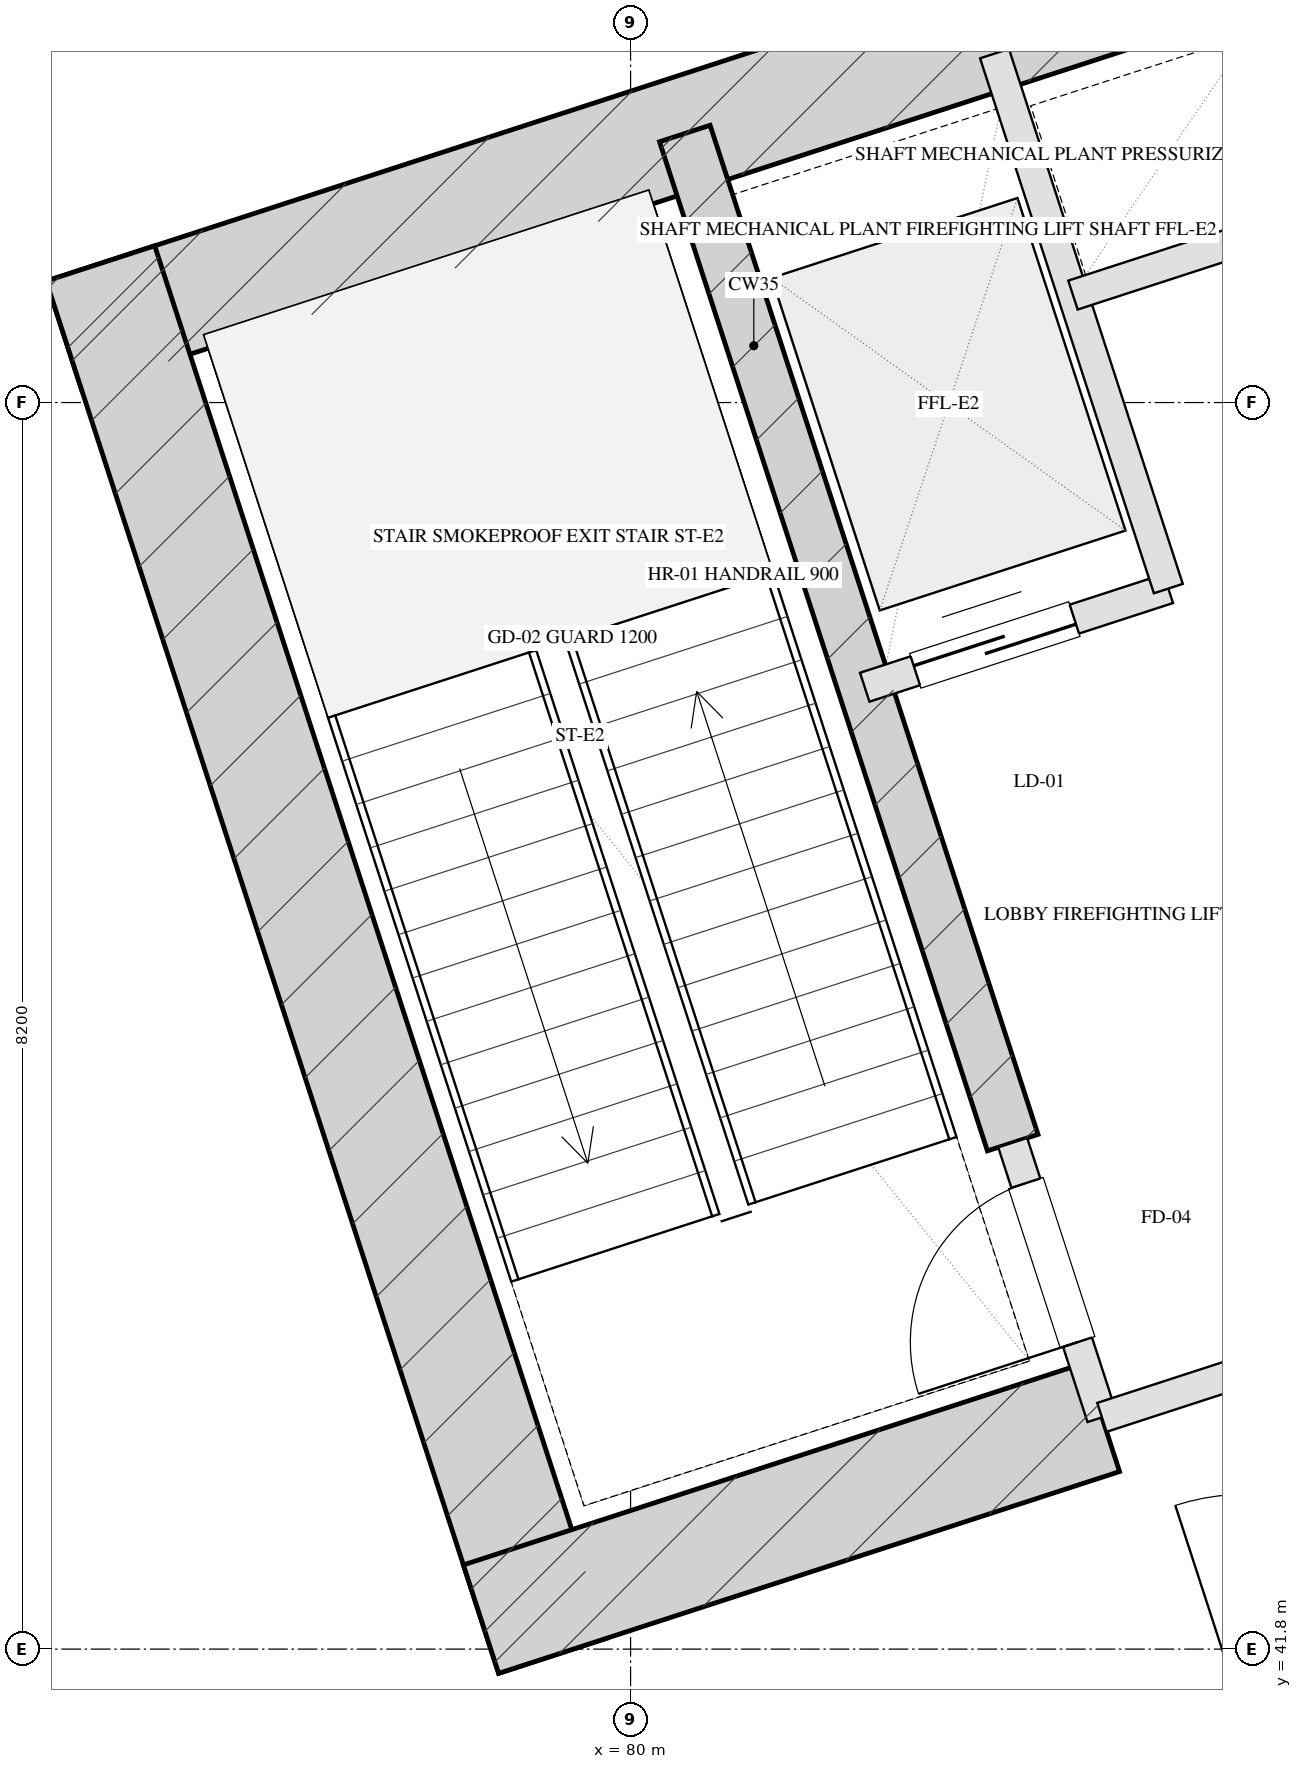
"""IFC4 building model, lengths in metres.
Left out: names, types, materials, properties, quantities, classifications, styles, units other than length and angle.
Written with IfcOpenShell. Run it as: python <this file> out.ifc"""

import sys

from ifc_helpers import new_model, si_unit, direction, frame, frame_2d, origin, place, context, subcontext, project, spatial, rectangle, extrude, element, fill, save


model = new_model("IFC4")
c1 = context("Model", 3, precision=1e-05, world=origin(), true_north=direction((0.0, 1.0)))
c2 = subcontext(c1, "Body", "Model", "MODEL_VIEW")
j1 = project(units=[si_unit("LENGTHUNIT", "METRE"), si_unit("PLANEANGLEUNIT", "RADIAN")], contexts=[c1])
p1 = place(None, origin())
s1 = spatial("IfcSite", under=j1, at=p1, CompositionType="ELEMENT")
p2 = place(p1, origin())
s2 = spatial("IfcBuilding", under=s1, at=p2, CompositionType="ELEMENT")
p3 = place(p2, frame((0.0, 0.0, 92.0)))
s3 = spatial("IfcBuildingStorey", under=s2, at=p3, CompositionType="ELEMENT", Elevation=92.0)
p4 = place(p3, frame((76.272, 50.443, 0.0), z_axis=(0.0, 0.0, 1.0), x_axis=(0.951056072937, 0.309018358888, 0.0)))
e1 = element("IfcWall", 1, at=p4, inside=s3, PredefinedType="SHEAR", context=c2, shape_type="SweptSolid", body=[
    extrude(rectangle(XDim=16.55, YDim=0.75, at=frame_2d((8.275, 0.0))), origin(), (0.0, 0.0, 1.0), 4.6),
])
p5 = place(p3, frame((79.489, 41.756, 0.0), z_axis=(0.0, 0.0, 1.0), x_axis=(-0.309016134813, 0.951056795583, 0.0)))
e2 = element("IfcWall", 2, at=p5, inside=s3, PredefinedType="SHEAR", context=c2, shape_type="SweptSolid", body=[
    extrude(rectangle(XDim=9.63, YDim=0.75, at=frame_2d((4.815, 0.0))), origin(), (0.0, 0.0, 1.0), 4.6),
])
p6 = place(p3, frame((82.514, 45.131, 0.0), z_axis=(0.0, 0.0, 1.0), x_axis=(-0.308988790936, 0.951065679686, 0.0)))
e3 = element("IfcWall", 3, at=p6, inside=s3, PredefinedType="SHEAR", context=c2, shape_type="SweptSolid", body=[
    extrude(rectangle(XDim=6.98, YDim=0.35, at=frame_2d((3.49, 0.0))), origin(), (0.0, 0.0, 1.0), 4.6),
])
p7 = place(p3, frame((79.016, 41.997, 0.0), z_axis=(0.0, 0.0, 1.0), x_axis=(0.95106038264, 0.309005094736, 0.0)))
e4 = element("IfcWall", 4, at=p7, inside=s3, PredefinedType="SHEAR", context=c2, shape_type="SweptSolid", body=[
    extrude(rectangle(XDim=4.295, YDim=0.75, at=frame_2d((2.147, 0.0))), origin(), (0.0, 0.0, 1.0), 4.6),
])
p8 = place(p3, frame((80.716, 6.59, 0.0), z_axis=(0.0, 0.0, 1.0), x_axis=(-0.309017542002, 0.95105633836, 0.0)))
e5 = element("IfcWall", 5, at=p8, inside=s3, PredefinedType="SOLIDWALL", context=c2, shape_type="SweptSolid", body=[
    extrude(rectangle(XDim=46.4, YDim=0.4, at=frame_2d((23.2, 0.0))), origin(), (0.0, 0.0, 1.0), 3.7),
])
p9 = place(p3, frame((83.101, 43.324, 0.0), z_axis=(0.0, 0.0, 1.0), x_axis=(-0.309048298632, 0.951046344356, 0.0)))
e6 = element("IfcWall", 6, at=p9, inside=s3, PredefinedType="PARTITIONING", context=c2, shape_type="SweptSolid", body=[
    extrude(rectangle(XDim=1.9, YDim=0.2, at=frame_2d((0.95, 0.0))), origin(), (0.0, 0.0, 1.0), 4.305),
])
p10 = place(p9, frame((0.52, 0.0, 0.0)))
e7 = element("IfcOpeningElement", 7, at=p10, cuts=e6, PredefinedType="OPENING", context=c2, shape_type="SweptSolid", body=[
    extrude(rectangle(XDim=1.1, YDim=2.05, at=frame_2d((0.55, 1.025))), frame((0.0, 0.11, 0.0), z_axis=(0.0, -1.0, 0.0), x_axis=(1.0, 0.0, 0.0)), (0.0, 0.0, 1.0), 0.22),
])
p11 = place(p3, frame((83.101, 43.324, 0.0), z_axis=(0.0, 0.0, 1.0), x_axis=(0.951052804469, 0.309028417967, 0.0)))
e8 = element("IfcWall", 8, at=p11, inside=s3, PredefinedType="PARTITIONING", context=c2, shape_type="SweptSolid", body=[
    extrude(rectangle(XDim=3.83, YDim=0.2, at=frame_2d((1.915, 0.0))), origin(), (0.0, 0.0, 1.0), 4.305),
])
p12 = place(p11, frame((1.35, 0.0, 0.0)))
e9 = element("IfcOpeningElement", 9, at=p12, cuts=e8, PredefinedType="OPENING", context=c2, shape_type="SweptSolid", body=[
    extrude(rectangle(XDim=1.2, YDim=2.05, at=frame_2d((0.6, 1.025))), frame((0.0, 0.11, 0.0), z_axis=(0.0, -1.0, 0.0), x_axis=(1.0, 0.0, 0.0)), (0.0, 0.0, 1.0), 0.22),
])
p13 = place(p3, frame((81.54, 48.127, 0.0), z_axis=(0.0, 0.0, 1.0), x_axis=(0.951062257173, 0.308999325213, 0.0)))
e10 = element("IfcWall", 10, at=p13, inside=s3, PredefinedType="PARTITIONING", context=c2, shape_type="SweptSolid", body=[
    extrude(rectangle(XDim=2.1, YDim=0.2, at=frame_2d((1.05, 0.0))), origin(), (0.0, 0.0, 1.0), 4.305),
])
p14 = place(p13, frame((0.35, 0.0, 0.0)))
e11 = element("IfcOpeningElement", 11, at=p14, cuts=e10, PredefinedType="OPENING", context=c2, shape_type="SweptSolid", body=[
    extrude(rectangle(XDim=1.1, YDim=2.05, at=frame_2d((0.55, 1.025))), frame((0.0, 0.11, 0.0), z_axis=(0.0, -1.0, 0.0), x_axis=(1.0, 0.0, 0.0)), (0.0, 0.0, 1.0), 0.22),
])
p15 = place(p3, frame((83.538, 48.776, 0.0), z_axis=(0.0, 0.0, 1.0), x_axis=(-0.3089935693, 0.951064127245, 0.0)))
e12 = element("IfcWall", 12, at=p15, inside=s3, PredefinedType="PARTITIONING", context=c2, shape_type="SweptSolid", body=[
    extrude(rectangle(XDim=3.7, YDim=0.2, at=frame_2d((1.85, 0.0))), origin(), (0.0, 0.0, 1.0), 4.305),
])
p16 = place(p3, frame((82.91, 50.707, 0.0), z_axis=(0.0, 0.0, 1.0), x_axis=(0.951041328149, 0.309063734775, 0.0)))
e13 = element("IfcWall", 13, at=p16, inside=s3, PredefinedType="PARTITIONING", context=c2, shape_type="SweptSolid", body=[
    extrude(rectangle(XDim=1.73, YDim=0.2, at=frame_2d((0.865, 0.0))), origin(), (0.0, 0.0, 1.0), 4.305),
])
p17 = place(p3, frame((71.018, 37.085, 0.0), z_axis=(0.0, 0.0, 1.0), x_axis=(0.951057423626, 0.309014201884, 0.0)))
e14 = element("IfcWall", 14, at=p17, inside=s3, PredefinedType="PARTITIONING", context=c2, shape_type="SweptSolid", body=[
    extrude(rectangle(XDim=15.9, YDim=0.2, at=frame_2d((7.95, 0.0))), origin(), (0.0, 0.0, 1.0), 3.515),
])
p18 = place(p17, frame((13.7, 0.0, 0.0)))
e15 = element("IfcOpeningElement", 15, at=p18, cuts=e14, PredefinedType="OPENING", context=c2, shape_type="SweptSolid", body=[
    extrude(rectangle(XDim=1.5, YDim=2.05, at=frame_2d((0.75, 1.025))), frame((0.0, 0.11, 0.0), z_axis=(0.0, -1.0, 0.0), x_axis=(1.0, 0.0, 0.0)), (0.0, 0.0, 1.0), 0.22),
])
p19 = place(p10, origin())
e16 = element("IfcDoor", 16, at=p19, inside=s3, OperationType="SINGLE_SWING_LEFT", PredefinedType="DOOR", context=c2, shape_type="SweptSolid", body=[
    extrude(rectangle(XDim=1.1, YDim=2.05, at=frame_2d((0.55, 1.025))), frame((0.0, 0.025, 0.0), z_axis=(0.0, -1.0, 0.0), x_axis=(1.0, 0.0, 0.0)), (0.0, 0.0, 1.0), 0.05),
])
fill(e7, e16)
p20 = place(p14, origin())
e17 = element("IfcDoor", 17, at=p20, inside=s3, OperationType="DOUBLE_DOOR_SLIDING", PredefinedType="DOOR", context=c2, shape_type="SweptSolid", body=[
    extrude(rectangle(XDim=1.1, YDim=2.05, at=frame_2d((0.55, 1.025))), frame((0.0, 0.025, 0.0), z_axis=(0.0, -1.0, 0.0), x_axis=(1.0, 0.0, 0.0)), (0.0, 0.0, 1.0), 0.05),
])
fill(e11, e17)
save(model, sys.argv[1])
